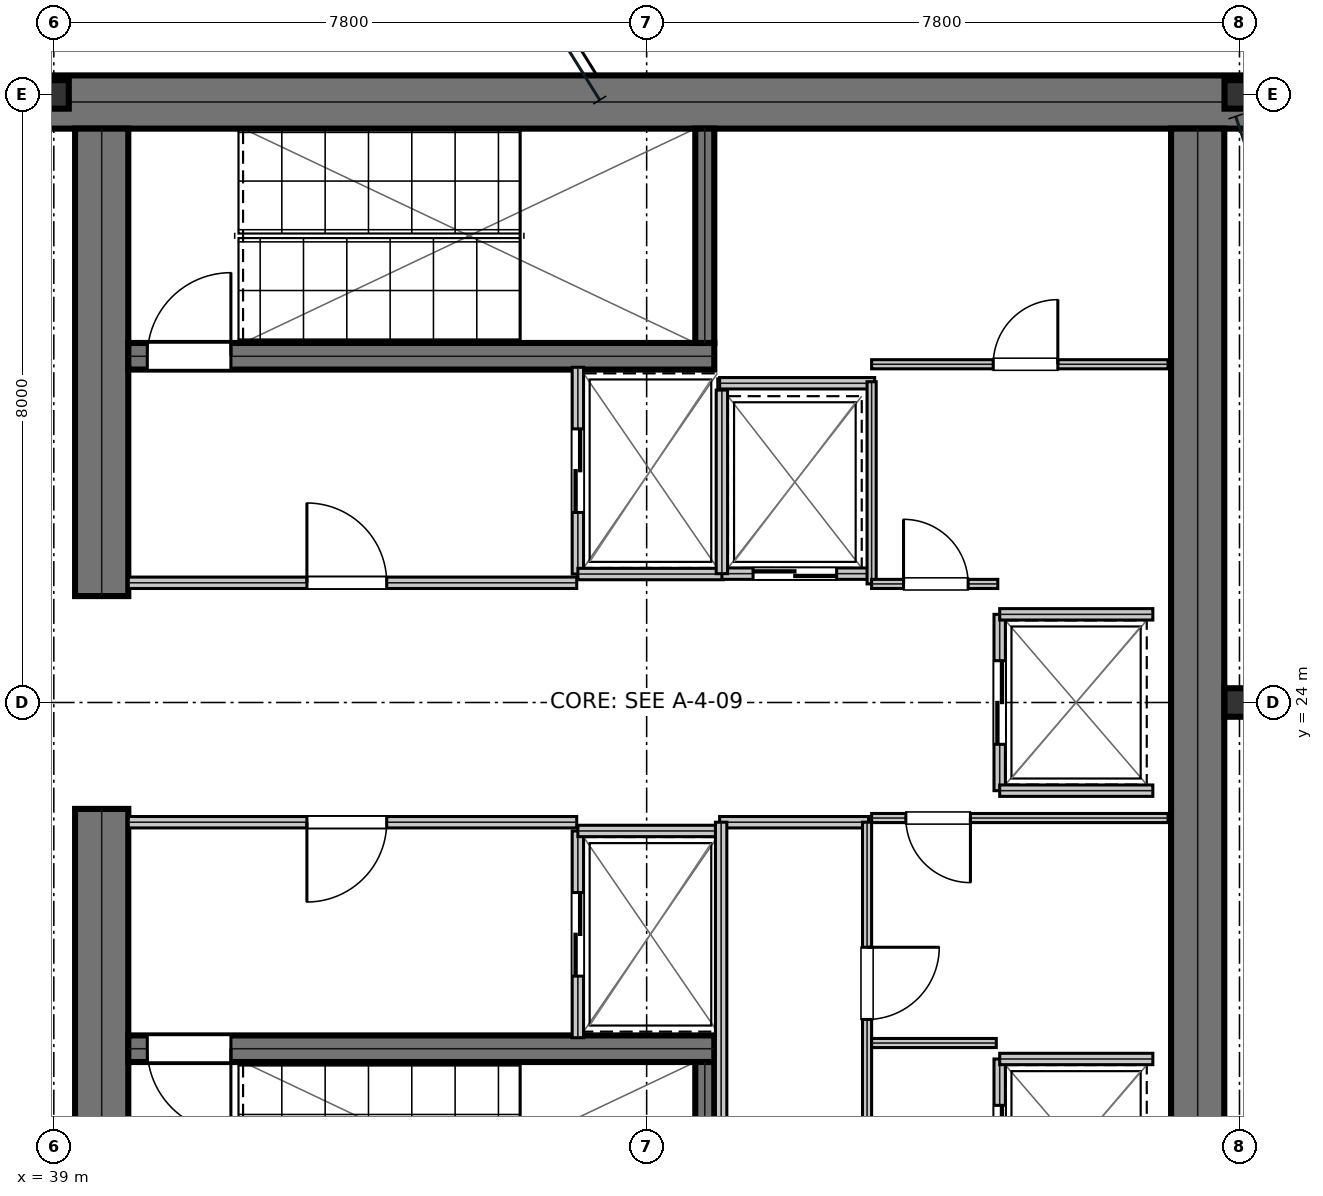
"""IFC4 building model, lengths in metres.
Left out: names, types, materials, properties, quantities, classifications, styles, units other than length and angle.
Written with IfcOpenShell. Run it as: python <this file> out.ifc"""

import sys

from ifc_helpers import new_model, si_unit, direction, frame, frame_2d, origin, origin_2d, place, context, subcontext, project, spatial, rectangle, i_section, extrude, element, fill, save


model = new_model("IFC4")
c1 = context("Model", 3, precision=1e-05, world=origin(), true_north=direction((0.0, 1.0)))
c2 = subcontext(c1, "Body", "Model", "MODEL_VIEW")
j1 = project(units=[si_unit("LENGTHUNIT", "METRE"), si_unit("PLANEANGLEUNIT", "RADIAN")], contexts=[c1])
p1 = place(None, origin())
s1 = spatial("IfcSite", under=j1, at=p1, CompositionType="ELEMENT")
p2 = place(p1, origin())
s2 = spatial("IfcBuilding", under=s1, at=p2, CompositionType="ELEMENT")
p3 = place(p2, frame((0.0, 0.0, 187.05)))
s3 = spatial("IfcBuildingStorey", under=s2, at=p3, CompositionType="ELEMENT", Elevation=187.05)
p4 = place(p3, frame((38.8, 31.9, 0.0), z_axis=(0.0, 0.0, 1.0), x_axis=(1.0, 0.0, 0.0)))
e1 = element("IfcWall", 1, at=p4, inside=s3, PredefinedType="SHEAR", context=c2, shape_type="SweptSolid", body=[
    extrude(rectangle(XDim=16.0, YDim=0.7, at=frame_2d((8.0, 0.0))), origin(), (0.0, 0.0, 1.0), 4.54),
])
for number, where, z_axis, x_axis in (
    (2, (39.63, 16.45, 0.0), (0.0, 0.0, 1.0), (0.0, 1.0, 0.0)),
    (3, (39.63, 25.4, 0.0), (0.0, 0.0, 1.0), (0.0, 1.0, 0.0)),
):
    element("IfcWall", number, at=place(p3, frame(where, z_axis=z_axis, x_axis=x_axis)), inside=s3, PredefinedType="SHEAR", context=c2, shape_type="SweptSolid", body=[
        extrude(rectangle(XDim=6.15, YDim=0.7, at=frame_2d((3.075, 0.0))), origin(), (0.0, 0.0, 1.0), 4.54),
    ])
p5 = place(p3, frame((54.05, 16.45, 0.0), z_axis=(0.0, 0.0, 1.0), x_axis=(0.0, 1.0, 0.0)))
e4 = element("IfcWall", 4, at=p5, inside=s3, PredefinedType="SHEAR", context=c2, shape_type="SweptSolid", body=[
    extrude(rectangle(XDim=15.1, YDim=0.7, at=frame_2d((7.55, 0.0))), origin(), (0.0, 0.0, 1.0), 4.54),
])
p6 = place(p3, frame((39.98, 28.555, 0.0), z_axis=(0.0, 0.0, 1.0), x_axis=(1.0, 0.0, 0.0)))
e5 = element("IfcWall", 5, at=p6, inside=s3, PredefinedType="SHEAR", context=c2, shape_type="SweptSolid", body=[
    extrude(rectangle(XDim=7.71, YDim=0.35, at=frame_2d((3.855, 0.0))), origin(), (0.0, 0.0, 1.0), 4.54),
])
p7 = place(p6, frame((0.25, 0.0, 0.0)))
e6 = element("IfcOpeningElement", 6, at=p7, cuts=e5, PredefinedType="OPENING", context=c2, shape_type="SweptSolid", body=[
    extrude(rectangle(XDim=1.1, YDim=2.15, at=frame_2d((0.55, 1.075))), frame((0.0, 0.185, 0.0), z_axis=(0.0, -1.0, 0.0), x_axis=(1.0, 0.0, 0.0)), (0.0, 0.0, 1.0), 0.37),
])
p8 = place(p3, frame((39.98, 19.445, 0.0), z_axis=(0.0, 0.0, 1.0), x_axis=(1.0, 0.0, 0.0)))
e7 = element("IfcWall", 7, at=p8, inside=s3, PredefinedType="SHEAR", context=c2, shape_type="SweptSolid", body=[
    extrude(rectangle(XDim=7.71, YDim=0.35, at=frame_2d((3.855, 0.0))), origin(), (0.0, 0.0, 1.0), 4.54),
])
p9 = place(p8, frame((0.25, 0.0, 0.0)))
e8 = element("IfcOpeningElement", 8, at=p9, cuts=e7, PredefinedType="OPENING", context=c2, shape_type="SweptSolid", body=[
    extrude(rectangle(XDim=1.1, YDim=2.15, at=frame_2d((0.55, 1.075))), frame((0.0, 0.185, 0.0), z_axis=(0.0, -1.0, 0.0), x_axis=(1.0, 0.0, 0.0)), (0.0, 0.0, 1.0), 0.37),
])
for number, where, z_axis, x_axis in (
    (9, (47.565, 28.73, 0.0), (0.0, 0.0, 1.0), (0.0, 1.0, 0.0)),
    (10, (47.565, 16.45, 0.0), (0.0, 0.0, 1.0), (0.0, 1.0, 0.0)),
):
    element("IfcWall", number, at=place(p3, frame(where, z_axis=z_axis, x_axis=x_axis)), inside=s3, PredefinedType="SHEAR", context=c2, shape_type="SweptSolid", body=[
        extrude(rectangle(XDim=2.82, YDim=0.25, at=frame_2d((1.41, 0.0))), origin(), (0.0, 0.0, 1.0), 4.54),
    ])
for number, where, z_axis, x_axis in (
    (11, (39.0, 32.0, 0.0), (0.0, 0.0, 1.0), (1.0, 0.0, 0.0)),
    (12, (54.6, 24.0, 0.0), (0.0, 0.0, 1.0), (1.0, 0.0, 0.0)),
    (13, (54.6, 32.0, 0.0), (0.0, 0.0, 1.0), (1.0, 0.0, 0.0)),
):
    element("IfcColumn", number, at=place(p3, frame(where, z_axis=z_axis, x_axis=x_axis)), inside=s3, PredefinedType="COLUMN", context=c2, shape_type="SweptSolid", body=[
        extrude(i_section(OverallWidth=0.394, OverallDepth=0.375, WebThickness=0.017, FlangeThickness=0.028, at=origin_2d()), origin(), (0.0, 0.0, 1.0), 4.794),
    ])
p10 = place(p3, frame((39.98, 25.575, 0.0), z_axis=(0.0, 0.0, 1.0), x_axis=(1.0, 0.0, 0.0)))
e14 = element("IfcWall", 14, at=p10, inside=s3, PredefinedType="PARTITIONING", context=c2, shape_type="SweptSolid", body=[
    extrude(rectangle(XDim=5.9, YDim=0.15, at=frame_2d((2.95, 0.0))), origin(), (0.0, 0.0, 1.0), 4.54),
])
p11 = place(p10, frame((2.35, 0.0, 0.0)))
e15 = element("IfcOpeningElement", 15, at=p11, cuts=e14, PredefinedType="OPENING", context=c2, shape_type="SweptSolid", body=[
    extrude(rectangle(XDim=1.05, YDim=2.15, at=frame_2d((0.525, 1.075))), frame((0.0, 0.085, 0.0), z_axis=(0.0, -1.0, 0.0), x_axis=(1.0, 0.0, 0.0)), (0.0, 0.0, 1.0), 0.17),
])
p12 = place(p3, frame((39.98, 22.425, 0.0), z_axis=(0.0, 0.0, 1.0), x_axis=(1.0, 0.0, 0.0)))
e16 = element("IfcWall", 16, at=p12, inside=s3, PredefinedType="PARTITIONING", context=c2, shape_type="SweptSolid", body=[
    extrude(rectangle(XDim=5.9, YDim=0.15, at=frame_2d((2.95, 0.0))), origin(), (0.0, 0.0, 1.0), 4.54),
])
p13 = place(p12, frame((2.35, 0.0, 0.0)))
e17 = element("IfcOpeningElement", 17, at=p13, cuts=e16, PredefinedType="OPENING", context=c2, shape_type="SweptSolid", body=[
    extrude(rectangle(XDim=1.05, YDim=2.15, at=frame_2d((0.525, 1.075))), frame((0.0, 0.085, 0.0), z_axis=(0.0, -1.0, 0.0), x_axis=(1.0, 0.0, 0.0)), (0.0, 0.0, 1.0), 0.17),
])
p14 = place(p3, frame((45.895, 25.69, 0.0), z_axis=(0.0, 0.0, 1.0), x_axis=(0.0, 1.0, 0.0)))
e18 = element("IfcWall", 18, at=p14, inside=s3, PredefinedType="PARTITIONING", context=c2, shape_type="SweptSolid", body=[
    extrude(rectangle(XDim=2.72, YDim=0.15, at=frame_2d((1.36, 0.0))), origin(), (0.0, 0.0, 1.0), 4.54),
])
p15 = place(p14, frame((0.81, 0.0, 0.0)))
e19 = element("IfcOpeningElement", 19, at=p15, cuts=e18, PredefinedType="OPENING", context=c2, shape_type="SweptSolid", body=[
    extrude(rectangle(XDim=1.1, YDim=2.15, at=frame_2d((0.55, 1.075))), frame((0.0, 0.085, 0.0), z_axis=(0.0, -1.0, 0.0), x_axis=(1.0, 0.0, 0.0)), (0.0, 0.0, 1.0), 0.17),
])
p16 = place(p3, frame((45.895, 25.69, 0.0), z_axis=(0.0, 0.0, 1.0), x_axis=(1.0, 0.0, 0.0)))
e20 = element("IfcWall", 20, at=p16, inside=s3, PredefinedType="PARTITIONING", context=c2, shape_type="SweptSolid", body=[
    extrude(rectangle(XDim=1.915, YDim=0.15, at=frame_2d((0.958, 0.0))), origin(), (0.0, 0.0, 1.0), 4.54),
])
p17 = place(p3, frame((45.895, 19.59, 0.0), z_axis=(0.0, 0.0, 1.0), x_axis=(0.0, 1.0, 0.0)))
e21 = element("IfcWall", 21, at=p17, inside=s3, PredefinedType="PARTITIONING", context=c2, shape_type="SweptSolid", body=[
    extrude(rectangle(XDim=2.72, YDim=0.15, at=frame_2d((1.36, 0.0))), origin(), (0.0, 0.0, 1.0), 4.54),
])
p18 = place(p17, frame((0.81, 0.0, 0.0)))
e22 = element("IfcOpeningElement", 22, at=p18, cuts=e21, PredefinedType="OPENING", context=c2, shape_type="SweptSolid", body=[
    extrude(rectangle(XDim=1.1, YDim=2.15, at=frame_2d((0.55, 1.075))), frame((0.0, 0.085, 0.0), z_axis=(0.0, -1.0, 0.0), x_axis=(1.0, 0.0, 0.0)), (0.0, 0.0, 1.0), 0.17),
])
p19 = place(p3, frame((45.895, 22.31, 0.0), z_axis=(0.0, 0.0, 1.0), x_axis=(1.0, 0.0, 0.0)))
e23 = element("IfcWall", 23, at=p19, inside=s3, PredefinedType="PARTITIONING", context=c2, shape_type="SweptSolid", body=[
    extrude(rectangle(XDim=1.915, YDim=0.15, at=frame_2d((0.958, 0.0))), origin(), (0.0, 0.0, 1.0), 4.54),
])
p20 = place(p3, frame((47.79, 25.695, 0.0), z_axis=(0.0, 0.0, 1.0), x_axis=(1.0, 0.0, 0.0)))
e24 = element("IfcWall", 24, at=p20, inside=s3, PredefinedType="PARTITIONING", context=c2, shape_type="SweptSolid", body=[
    extrude(rectangle(XDim=1.92, YDim=0.15, at=frame_2d((0.96, 0.0))), origin(), (0.0, 0.0, 1.0), 4.54),
])
p21 = place(p20, frame((0.41, 0.0, 0.0)))
e25 = element("IfcOpeningElement", 25, at=p21, cuts=e24, PredefinedType="OPENING", context=c2, shape_type="SweptSolid", body=[
    extrude(rectangle(XDim=1.1, YDim=2.15, at=frame_2d((0.55, 1.075))), frame((0.0, 0.085, 0.0), z_axis=(0.0, -1.0, 0.0), x_axis=(1.0, 0.0, 0.0)), (0.0, 0.0, 1.0), 0.17),
])
p22 = place(p3, frame((47.79, 25.695, 0.0), z_axis=(0.0, 0.0, 1.0), x_axis=(0.0, 1.0, 0.0)))
e26 = element("IfcWall", 26, at=p22, inside=s3, PredefinedType="PARTITIONING", context=c2, shape_type="SweptSolid", body=[
    extrude(rectangle(XDim=2.415, YDim=0.15, at=frame_2d((1.208, 0.0))), origin(), (0.0, 0.0, 1.0), 4.54),
])
p23 = place(p3, frame((51.445, 22.84, 0.0), z_axis=(0.0, 0.0, 1.0), x_axis=(0.0, 1.0, 0.0)))
e27 = element("IfcWall", 27, at=p23, inside=s3, PredefinedType="PARTITIONING", context=c2, shape_type="SweptSolid", body=[
    extrude(rectangle(XDim=2.32, YDim=0.15, at=frame_2d((1.16, 0.0))), origin(), (0.0, 0.0, 1.0), 4.54),
])
p24 = place(p23, frame((0.61, 0.0, 0.0)))
e28 = element("IfcOpeningElement", 28, at=p24, cuts=e27, PredefinedType="OPENING", context=c2, shape_type="SweptSolid", body=[
    extrude(rectangle(XDim=1.1, YDim=2.15, at=frame_2d((0.55, 1.075))), frame((0.0, 0.085, 0.0), z_axis=(0.0, -1.0, 0.0), x_axis=(1.0, 0.0, 0.0)), (0.0, 0.0, 1.0), 0.17),
])
for number, where, z_axis, x_axis in (
    (29, (51.445, 22.84, 0.0), (0.0, 0.0, 1.0), (1.0, 0.0, 0.0)),
    (30, (51.445, 25.16, 0.0), (0.0, 0.0, 1.0), (1.0, 0.0, 0.0)),
):
    element("IfcWall", number, at=place(p3, frame(where, z_axis=z_axis, x_axis=x_axis)), inside=s3, PredefinedType="PARTITIONING", context=c2, shape_type="SweptSolid", body=[
        extrude(rectangle(XDim=2.015, YDim=0.15, at=frame_2d((1.007, 0.0))), origin(), (0.0, 0.0, 1.0), 4.54),
    ])
p25 = place(p3, frame((51.445, 16.99, 0.0), z_axis=(0.0, 0.0, 1.0), x_axis=(0.0, 1.0, 0.0)))
e31 = element("IfcWall", 31, at=p25, inside=s3, PredefinedType="PARTITIONING", context=c2, shape_type="SweptSolid", body=[
    extrude(rectangle(XDim=2.32, YDim=0.15, at=frame_2d((1.16, 0.0))), origin(), (0.0, 0.0, 1.0), 4.54),
])
p26 = place(p25, frame((0.61, 0.0, 0.0)))
e32 = element("IfcOpeningElement", 32, at=p26, cuts=e31, PredefinedType="OPENING", context=c2, shape_type="SweptSolid", body=[
    extrude(rectangle(XDim=1.1, YDim=2.15, at=frame_2d((0.55, 1.075))), frame((0.0, 0.085, 0.0), z_axis=(0.0, -1.0, 0.0), x_axis=(1.0, 0.0, 0.0)), (0.0, 0.0, 1.0), 0.17),
])
p27 = place(p3, frame((51.445, 19.31, 0.0), z_axis=(0.0, 0.0, 1.0), x_axis=(1.0, 0.0, 0.0)))
e33 = element("IfcWall", 33, at=p27, inside=s3, PredefinedType="PARTITIONING", context=c2, shape_type="SweptSolid", body=[
    extrude(rectangle(XDim=2.015, YDim=0.15, at=frame_2d((1.007, 0.0))), origin(), (0.0, 0.0, 1.0), 4.54),
])
p28 = place(p3, frame((47.76, 22.425, 0.0), z_axis=(0.0, 0.0, 1.0), x_axis=(1.0, 0.0, 0.0)))
e34 = element("IfcWall", 34, at=p28, inside=s3, PredefinedType="PARTITIONING", context=c2, shape_type="SweptSolid", body=[
    extrude(rectangle(XDim=1.96, YDim=0.15, at=frame_2d((0.98, 0.0))), origin(), (0.0, 0.0, 1.0), 4.54),
])
p29 = place(p3, frame((47.78, 16.45, 0.0), z_axis=(0.0, 0.0, 1.0), x_axis=(0.0, 1.0, 0.0)))
e35 = element("IfcWall", 35, at=p29, inside=s3, PredefinedType="PARTITIONING", context=c2, shape_type="SweptSolid", body=[
    extrude(rectangle(XDim=5.975, YDim=0.15, at=frame_2d((2.988, 0.0))), origin(), (0.0, 0.0, 1.0), 4.54),
])
p30 = place(p3, frame((49.7, 16.48, 0.0), z_axis=(0.0, 0.0, 1.0), x_axis=(0.0, 1.0, 0.0)))
e36 = element("IfcWall", 36, at=p30, inside=s3, PredefinedType="PARTITIONING", context=c2, shape_type="SweptSolid", body=[
    extrude(rectangle(XDim=5.945, YDim=0.12, at=frame_2d((2.973, 0.0))), origin(), (0.0, 0.0, 1.0), 4.54),
])
p31 = place(p30, frame((3.35, 0.0, 0.0)))
e37 = element("IfcOpeningElement", 37, at=p31, cuts=e36, PredefinedType="OPENING", context=c2, shape_type="SweptSolid", body=[
    extrude(rectangle(XDim=0.95, YDim=2.15, at=frame_2d((0.475, 1.075))), frame((0.0, 0.07, 0.0), z_axis=(0.0, -1.0, 0.0), x_axis=(1.0, 0.0, 0.0)), (0.0, 0.0, 1.0), 0.14),
])
p32 = place(p3, frame((49.76, 22.48, 0.0), z_axis=(0.0, 0.0, 1.0), x_axis=(1.0, 0.0, 0.0)))
e38 = element("IfcWall", 38, at=p32, inside=s3, PredefinedType="PARTITIONING", context=c2, shape_type="SweptSolid", body=[
    extrude(rectangle(XDim=3.9, YDim=0.12, at=frame_2d((1.95, 0.0))), origin(), (0.0, 0.0, 1.0), 4.54),
])
p33 = place(p32, frame((0.45, 0.0, 0.0)))
e39 = element("IfcOpeningElement", 39, at=p33, cuts=e38, PredefinedType="OPENING", context=c2, shape_type="SweptSolid", body=[
    extrude(rectangle(XDim=0.85, YDim=2.15, at=frame_2d((0.425, 1.075))), frame((0.0, 0.07, 0.0), z_axis=(0.0, -1.0, 0.0), x_axis=(1.0, 0.0, 0.0)), (0.0, 0.0, 1.0), 0.14),
])
p34 = place(p3, frame((49.76, 19.52, 0.0), z_axis=(0.0, 0.0, 1.0), x_axis=(1.0, 0.0, 0.0)))
e40 = element("IfcWall", 40, at=p34, inside=s3, PredefinedType="PARTITIONING", context=c2, shape_type="SweptSolid", body=[
    extrude(rectangle(XDim=1.64, YDim=0.12, at=frame_2d((0.82, 0.0))), origin(), (0.0, 0.0, 1.0), 4.54),
])
p35 = place(p3, frame((47.76, 28.2, 0.0), z_axis=(0.0, 0.0, 1.0), x_axis=(1.0, 0.0, 0.0)))
e41 = element("IfcWall", 41, at=p35, inside=s3, PredefinedType="PARTITIONING", context=c2, shape_type="SweptSolid", body=[
    extrude(rectangle(XDim=2.04, YDim=0.15, at=frame_2d((1.02, 0.0))), origin(), (0.0, 0.0, 1.0), 4.54),
])
p36 = place(p3, frame((49.76, 25.56, 0.0), z_axis=(0.0, 0.0, 1.0), x_axis=(0.0, 1.0, 0.0)))
e42 = element("IfcWall", 42, at=p36, inside=s3, PredefinedType="PARTITIONING", context=c2, shape_type="SweptSolid", body=[
    extrude(rectangle(XDim=2.66, YDim=0.12, at=frame_2d((1.33, 0.0))), origin(), (0.0, 0.0, 1.0), 4.54),
])
p37 = place(p3, frame((49.76, 25.56, 0.0), z_axis=(0.0, 0.0, 1.0), x_axis=(1.0, 0.0, 0.0)))
e43 = element("IfcWall", 43, at=p37, inside=s3, PredefinedType="PARTITIONING", context=c2, shape_type="SweptSolid", body=[
    extrude(rectangle(XDim=1.66, YDim=0.12, at=frame_2d((0.83, 0.0))), origin(), (0.0, 0.0, 1.0), 4.54),
])
p38 = place(p37, frame((0.42, 0.0, 0.0)))
e44 = element("IfcOpeningElement", 44, at=p38, cuts=e43, PredefinedType="OPENING", context=c2, shape_type="SweptSolid", body=[
    extrude(rectangle(XDim=0.85, YDim=2.15, at=frame_2d((0.425, 1.075))), frame((0.0, 0.07, 0.0), z_axis=(0.0, -1.0, 0.0), x_axis=(1.0, 0.0, 0.0)), (0.0, 0.0, 1.0), 0.14),
])
p39 = place(p3, frame((49.76, 28.45, 0.0), z_axis=(0.0, 0.0, 1.0), x_axis=(1.0, 0.0, 0.0)))
e45 = element("IfcWall", 45, at=p39, inside=s3, PredefinedType="PARTITIONING", context=c2, shape_type="SweptSolid", body=[
    extrude(rectangle(XDim=3.9, YDim=0.12, at=frame_2d((1.95, 0.0))), origin(), (0.0, 0.0, 1.0), 4.54),
])
p40 = place(p39, frame((1.6, 0.0, 0.0)))
e46 = element("IfcOpeningElement", 46, at=p40, cuts=e45, PredefinedType="OPENING", context=c2, shape_type="SweptSolid", body=[
    extrude(rectangle(XDim=0.85, YDim=2.15, at=frame_2d((0.425, 1.075))), frame((0.0, 0.07, 0.0), z_axis=(0.0, -1.0, 0.0), x_axis=(1.0, 0.0, 0.0)), (0.0, 0.0, 1.0), 0.14),
])
p41 = place(p11, origin())
e47 = element("IfcDoor", 47, at=p41, inside=s3, OperationType="SINGLE_SWING_LEFT", PredefinedType="DOOR", context=c2, shape_type="SweptSolid", body=[
    extrude(rectangle(XDim=1.05, YDim=2.15, at=frame_2d((0.525, 1.075))), frame((0.0, 0.025, 0.0), z_axis=(0.0, -1.0, 0.0), x_axis=(1.0, 0.0, 0.0)), (0.0, 0.0, 1.0), 0.05),
])
fill(e15, e47)
p42 = place(p13, frame((1.05, 0.0, 0.0), z_axis=(0.0, 0.0, 1.0), x_axis=(-1.0, 0.0, 0.0)))
e48 = element("IfcDoor", 48, at=p42, inside=s3, OperationType="SINGLE_SWING_RIGHT", PredefinedType="DOOR", context=c2, shape_type="SweptSolid", body=[
    extrude(rectangle(XDim=1.05, YDim=2.15, at=frame_2d((0.525, 1.075))), frame((0.0, 0.025, 0.0), z_axis=(0.0, -1.0, 0.0), x_axis=(1.0, 0.0, 0.0)), (0.0, 0.0, 1.0), 0.05),
])
fill(e17, e48)
p43 = place(p15, frame((1.1, 0.0, 0.0), z_axis=(0.0, 0.0, 1.0), x_axis=(-1.0, 0.0, 0.0)))
e49 = element("IfcDoor", 49, at=p43, inside=s3, OperationType="DOUBLE_DOOR_SLIDING", PredefinedType="DOOR", context=c2, shape_type="SweptSolid", body=[
    extrude(rectangle(XDim=1.1, YDim=2.15, at=frame_2d((0.55, 1.075))), frame((0.0, 0.025, 0.0), z_axis=(0.0, -1.0, 0.0), x_axis=(1.0, 0.0, 0.0)), (0.0, 0.0, 1.0), 0.05),
])
fill(e19, e49)
p44 = place(p18, frame((1.1, 0.0, 0.0), z_axis=(0.0, 0.0, 1.0), x_axis=(-1.0, 0.0, 0.0)))
e50 = element("IfcDoor", 50, at=p44, inside=s3, OperationType="DOUBLE_DOOR_SLIDING", PredefinedType="DOOR", context=c2, shape_type="SweptSolid", body=[
    extrude(rectangle(XDim=1.1, YDim=2.15, at=frame_2d((0.55, 1.075))), frame((0.0, 0.025, 0.0), z_axis=(0.0, -1.0, 0.0), x_axis=(1.0, 0.0, 0.0)), (0.0, 0.0, 1.0), 0.05),
])
fill(e22, e50)
p45 = place(p21, frame((1.1, 0.0, 0.0), z_axis=(0.0, 0.0, 1.0), x_axis=(-1.0, 0.0, 0.0)))
e51 = element("IfcDoor", 51, at=p45, inside=s3, OperationType="DOUBLE_DOOR_SLIDING", PredefinedType="DOOR", context=c2, shape_type="SweptSolid", body=[
    extrude(rectangle(XDim=1.1, YDim=2.15, at=frame_2d((0.55, 1.075))), frame((0.0, 0.025, 0.0), z_axis=(0.0, -1.0, 0.0), x_axis=(1.0, 0.0, 0.0)), (0.0, 0.0, 1.0), 0.05),
])
fill(e25, e51)
p46 = place(p24, frame((1.1, 0.0, 0.0), z_axis=(0.0, 0.0, 1.0), x_axis=(-1.0, 0.0, 0.0)))
e52 = element("IfcDoor", 52, at=p46, inside=s3, OperationType="DOUBLE_DOOR_SLIDING", PredefinedType="DOOR", context=c2, shape_type="SweptSolid", body=[
    extrude(rectangle(XDim=1.1, YDim=2.15, at=frame_2d((0.55, 1.075))), frame((0.0, 0.025, 0.0), z_axis=(0.0, -1.0, 0.0), x_axis=(1.0, 0.0, 0.0)), (0.0, 0.0, 1.0), 0.05),
])
fill(e28, e52)
p47 = place(p26, frame((1.1, 0.0, 0.0), z_axis=(0.0, 0.0, 1.0), x_axis=(-1.0, 0.0, 0.0)))
e53 = element("IfcDoor", 53, at=p47, inside=s3, OperationType="DOUBLE_DOOR_SLIDING", PredefinedType="DOOR", context=c2, shape_type="SweptSolid", body=[
    extrude(rectangle(XDim=1.1, YDim=2.15, at=frame_2d((0.55, 1.075))), frame((0.0, 0.025, 0.0), z_axis=(0.0, -1.0, 0.0), x_axis=(1.0, 0.0, 0.0)), (0.0, 0.0, 1.0), 0.05),
])
fill(e32, e53)
p48 = place(p31, frame((0.95, 0.0, 0.0), z_axis=(0.0, 0.0, 1.0), x_axis=(-1.0, 0.0, 0.0)))
e54 = element("IfcDoor", 54, at=p48, inside=s3, OperationType="SINGLE_SWING_LEFT", PredefinedType="DOOR", context=c2, shape_type="SweptSolid", body=[
    extrude(rectangle(XDim=0.95, YDim=2.15, at=frame_2d((0.475, 1.075))), frame((0.0, 0.025, 0.0), z_axis=(0.0, -1.0, 0.0), x_axis=(1.0, 0.0, 0.0)), (0.0, 0.0, 1.0), 0.05),
])
fill(e37, e54)
p49 = place(p33, frame((0.85, 0.0, 0.0), z_axis=(0.0, 0.0, 1.0), x_axis=(-1.0, 0.0, 0.0)))
e55 = element("IfcDoor", 55, at=p49, inside=s3, OperationType="SINGLE_SWING_LEFT", PredefinedType="DOOR", context=c2, shape_type="SweptSolid", body=[
    extrude(rectangle(XDim=0.85, YDim=2.15, at=frame_2d((0.425, 1.075))), frame((0.0, 0.025, 0.0), z_axis=(0.0, -1.0, 0.0), x_axis=(1.0, 0.0, 0.0)), (0.0, 0.0, 1.0), 0.05),
])
fill(e39, e55)
p50 = place(p38, origin())
e56 = element("IfcDoor", 56, at=p50, inside=s3, OperationType="SINGLE_SWING_LEFT", PredefinedType="DOOR", context=c2, shape_type="SweptSolid", body=[
    extrude(rectangle(XDim=0.85, YDim=2.15, at=frame_2d((0.425, 1.075))), frame((0.0, 0.025, 0.0), z_axis=(0.0, -1.0, 0.0), x_axis=(1.0, 0.0, 0.0)), (0.0, 0.0, 1.0), 0.05),
])
fill(e44, e56)
p51 = place(p40, origin())
e57 = element("IfcDoor", 57, at=p51, inside=s3, OperationType="SINGLE_SWING_RIGHT", PredefinedType="DOOR", context=c2, shape_type="SweptSolid", body=[
    extrude(rectangle(XDim=0.85, YDim=2.15, at=frame_2d((0.425, 1.075))), frame((0.0, 0.025, 0.0), z_axis=(0.0, -1.0, 0.0), x_axis=(1.0, 0.0, 0.0)), (0.0, 0.0, 1.0), 0.05),
])
fill(e46, e57)
p52 = place(p7, origin())
e58 = element("IfcDoor", 58, at=p52, inside=s3, OperationType="SINGLE_SWING_RIGHT", PredefinedType="DOOR", context=c2, shape_type="SweptSolid", body=[
    extrude(rectangle(XDim=1.1, YDim=2.15, at=frame_2d((0.55, 1.075))), frame((0.0, 0.025, 0.0), z_axis=(0.0, -1.0, 0.0), x_axis=(1.0, 0.0, 0.0)), (0.0, 0.0, 1.0), 0.05),
])
fill(e6, e58)
p53 = place(p9, frame((1.1, 0.0, 0.0), z_axis=(0.0, 0.0, 1.0), x_axis=(-1.0, 0.0, 0.0)))
e59 = element("IfcDoor", 59, at=p53, inside=s3, OperationType="SINGLE_SWING_LEFT", PredefinedType="DOOR", context=c2, shape_type="SweptSolid", body=[
    extrude(rectangle(XDim=1.1, YDim=2.15, at=frame_2d((0.55, 1.075))), frame((0.0, 0.025, 0.0), z_axis=(0.0, -1.0, 0.0), x_axis=(1.0, 0.0, 0.0)), (0.0, 0.0, 1.0), 0.05),
])
fill(e8, e59)
save(model, sys.argv[1])
